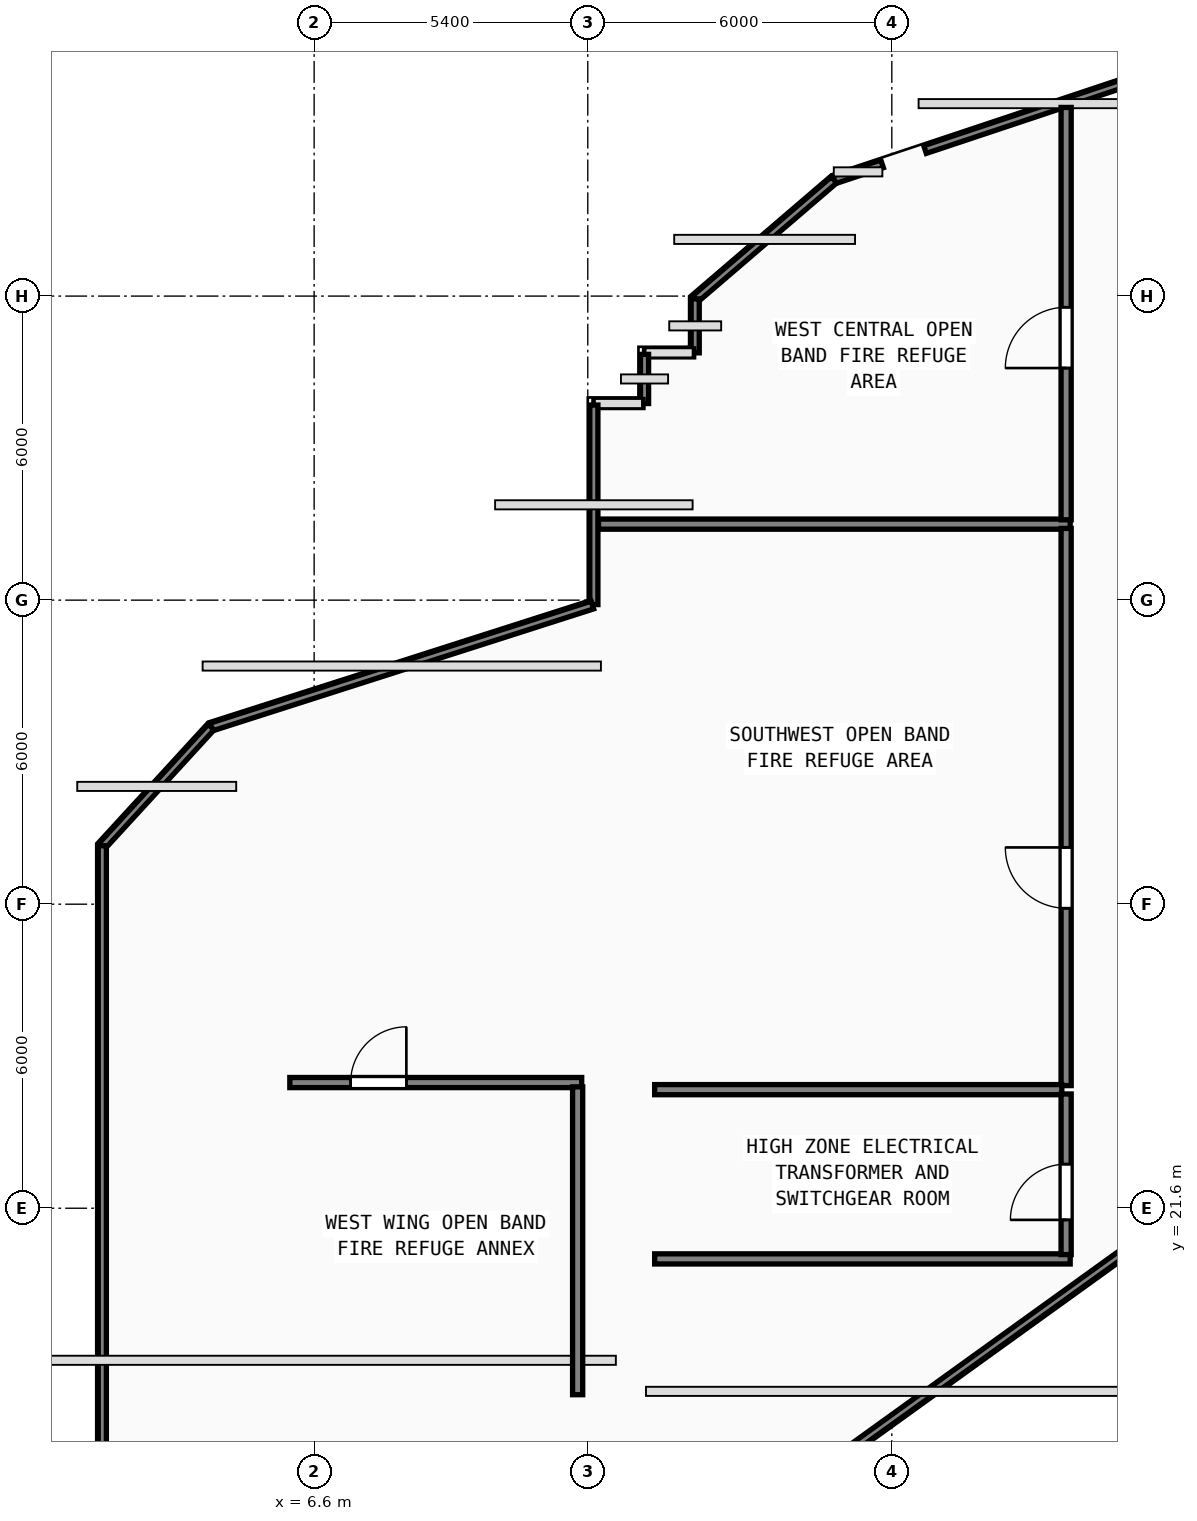
"""IFC4 building model, lengths in metres.
Left out: names, types, materials, properties, quantities, classifications, styles, units other than length and angle.
Written with IfcOpenShell. Run it as: python <this file> out.ifc"""

import sys

from ifc_helpers import new_model, si_unit, direction, frame, frame_2d, origin, origin_2d, place, context, subcontext, project, spatial, rectangle, hollow_rectangle, extrude, element, fill, save


model = new_model("IFC4")
c1 = context("Model", 3, precision=1e-05, world=origin(), true_north=direction((0.0, 1.0)))
c2 = subcontext(c1, "Body", "Model", "MODEL_VIEW")
j1 = project(units=[si_unit("LENGTHUNIT", "METRE"), si_unit("PLANEANGLEUNIT", "RADIAN")], contexts=[c1])
p1 = place(None, origin())
s1 = spatial("IfcSite", under=j1, at=p1, CompositionType="ELEMENT")
p2 = place(p1, origin())
s2 = spatial("IfcBuilding", under=s1, at=p2, CompositionType="ELEMENT")
p3 = place(p2, frame((0.0, 0.0, 43.0)))
s3 = spatial("IfcBuildingStorey", under=s2, at=p3, CompositionType="ELEMENT", Elevation=43.0)
for number, where, z_axis, x_axis in (
    (1, (12.6, 16.8, 0.0), (0.0, 0.0, 1.0), (1.0, 0.0, 0.0)),
    (2, (12.6, 27.6, 0.0), (0.0, 0.0, 1.0), (1.0, 0.0, 0.0)),
):
    element("IfcColumn", number, at=place(p3, frame(where, z_axis=z_axis, x_axis=x_axis)), inside=s3, PredefinedType="COLUMN", context=c2, shape_type="SweptSolid", body=[
        extrude(hollow_rectangle(XDim=1.3, YDim=1.3, WallThickness=0.048, at=origin_2d()), origin(), (0.0, 0.0, 1.0), 4.6),
    ])
for number, where, z_axis, x_axis in (
    (3, (6.0, 17.4, 0.0), (0.0, 0.0, 1.0), (1.0, 0.0, 0.0)),
    (4, (6.0, 27.6, 0.0), (0.0, 0.0, 1.0), (1.0, 0.0, 0.0)),
):
    element("IfcColumn", number, at=place(p3, frame(where, z_axis=z_axis, x_axis=x_axis)), inside=s3, PredefinedType="COLUMN", context=c2, shape_type="SweptSolid", body=[
        extrude(hollow_rectangle(XDim=1.15, YDim=1.15, WallThickness=0.042, at=origin_2d()), origin(), (0.0, 0.0, 1.0), 4.6),
    ])
for number, where, z_axis, x_axis in (
    (5, (18.3, 19.2, 0.0), (0.0, 0.0, 1.0), (1.0, 0.0, 0.0)),
    (6, (18.3, 42.0, 0.0), (0.0, 0.0, 1.0), (1.0, 0.0, 0.0)),
    (7, (9.3, 17.1, 0.0), (0.0, 0.0, 1.0), (1.0, 0.0, 0.0)),
    (8, (9.3, 27.6, 0.0), (0.0, 0.0, 1.0), (1.0, 0.0, 0.0)),
):
    element("IfcColumn", number, at=place(p3, frame(where, z_axis=z_axis, x_axis=x_axis)), inside=s3, PredefinedType="COLUMN", context=c2, shape_type="SweptSolid", body=[
        extrude(hollow_rectangle(XDim=1.0, YDim=1.0, WallThickness=0.038, at=origin_2d()), origin(), (0.0, 0.0, 1.0), 4.6),
    ])
p4 = place(p3, frame((14.193, 14.687, 0.0), z_axis=(0.0, 0.0, 1.0), x_axis=(0.81153516154, 0.584303586832, 0.0)))
e9 = element("IfcWall", 9, at=p4, inside=s3, PredefinedType="PARAPET", context=c2, shape_type="SweptSolid", body=[
    extrude(rectangle(XDim=11.293, YDim=0.16, at=frame_2d((5.646, 0.0))), origin(), (0.0, 0.0, 1.0), 1.15),
])
p5 = place(p3, frame((24.092, 44.304, 0.0), z_axis=(0.0, 0.0, 1.0), x_axis=(-0.948683298051, -0.316227766017, 0.0)))
e10 = element("IfcWall", 10, at=p5, inside=s3, PredefinedType="PARAPET", context=c2, shape_type="SweptSolid", body=[
    extrude(rectangle(XDim=5.73, YDim=0.16, at=frame_2d((2.865, 0.0))), origin(), (0.0, 0.0, 1.0), 1.15),
])
p6 = place(p3, frame((17.808, 42.209, 0.0), z_axis=(0.0, 0.0, 1.0), x_axis=(-0.948707727558, -0.316154468056, 0.0)))
e11 = element("IfcWall", 11, at=p6, inside=s3, PredefinedType="PARAPET", context=c2, shape_type="SweptSolid", body=[
    extrude(rectangle(XDim=0.999, YDim=0.16, at=frame_2d((0.5, 0.0))), origin(), (0.0, 0.0, 1.0), 1.15),
])
p7 = place(p3, frame((16.86, 41.894, 0.0), z_axis=(0.0, 0.0, 1.0), x_axis=(-0.759247051556, -0.650802515902, 0.0)))
e12 = element("IfcWall", 12, at=p7, inside=s3, PredefinedType="PARAPET", context=c2, shape_type="SweptSolid", body=[
    extrude(rectangle(XDim=3.609, YDim=0.16, at=frame_2d((1.804, 0.0))), origin(), (0.0, 0.0, 1.0), 1.15),
])
p8 = place(p3, frame((14.12, 39.545, 0.0), z_axis=(0.0, 0.0, 1.0), x_axis=(0.0, -1.0, 0.0)))
e13 = element("IfcWall", 13, at=p8, inside=s3, PredefinedType="PARAPET", context=c2, shape_type="SweptSolid", body=[
    extrude(rectangle(XDim=1.065, YDim=0.16, at=frame_2d((0.532, 0.0))), origin(), (0.0, 0.0, 1.0), 1.15),
])
for number, where, z_axis, x_axis in (
    (14, (14.09, 38.48, 0.0), (0.0, 0.0, 1.0), (-1.0, 0.0, 0.0)),
    (15, (13.12, 38.45, 0.0), (0.0, 0.0, 1.0), (0.0, -1.0, 0.0)),
    (16, (13.09, 37.48, 0.0), (0.0, 0.0, 1.0), (-1.0, 0.0, 0.0)),
):
    element("IfcWall", number, at=place(p3, frame(where, z_axis=z_axis, x_axis=x_axis)), inside=s3, PredefinedType="PARAPET", context=c2, shape_type="SweptSolid", body=[
        extrude(rectangle(XDim=0.97, YDim=0.16, at=frame_2d((0.485, 0.0))), origin(), (0.0, 0.0, 1.0), 1.15),
    ])
p9 = place(p3, frame((12.12, 37.45, 0.0), z_axis=(0.0, 0.0, 1.0), x_axis=(0.0, -1.0, 0.0)))
e17 = element("IfcWall", 17, at=p9, inside=s3, PredefinedType="PARAPET", context=c2, shape_type="SweptSolid", body=[
    extrude(rectangle(XDim=3.938, YDim=0.16, at=frame_2d((1.969, 0.0))), origin(), (0.0, 0.0, 1.0), 1.15),
])
p10 = place(p3, frame((12.091, 33.503, 0.0), z_axis=(0.0, 0.0, 1.0), x_axis=(-0.952418764882, -0.304792546334, 0.0)))
e18 = element("IfcWall", 18, at=p10, inside=s3, PredefinedType="PARAPET", context=c2, shape_type="SweptSolid", body=[
    extrude(rectangle(XDim=7.9, YDim=0.16, at=frame_2d((3.95, 0.0))), origin(), (0.0, 0.0, 1.0), 1.15),
])
p11 = place(p3, frame((4.567, 31.095, 0.0), z_axis=(0.0, 0.0, 1.0), x_axis=(-0.67574202635, -0.73713819181, 0.0)))
e19 = element("IfcWall", 19, at=p11, inside=s3, PredefinedType="PARAPET", context=c2, shape_type="SweptSolid", body=[
    extrude(rectangle(XDim=3.177, YDim=0.16, at=frame_2d((1.589, 0.0))), origin(), (0.0, 0.0, 1.0), 1.15),
])
p12 = place(p3, frame((2.42, 28.753, 0.0), z_axis=(0.0, 0.0, 1.0), x_axis=(0.0, -1.0, 0.0)))
e20 = element("IfcWall", 20, at=p12, inside=s3, PredefinedType="PARAPET", context=c2, shape_type="SweptSolid", body=[
    extrude(rectangle(XDim=20.308, YDim=0.16, at=frame_2d((10.154, 0.0))), origin(), (0.0, 0.0, 1.0), 1.15),
])
p13 = place(p3, frame((12.212, 35.1, 0.0), z_axis=(0.0, 0.0, 1.0), x_axis=(1.0, 0.0, 0.0)))
e21 = element("IfcWall", 21, at=p13, inside=s3, PredefinedType="SOLIDWALL", context=c2, shape_type="SweptSolid", body=[
    extrude(rectangle(XDim=9.308, YDim=0.2, at=frame_2d((4.654, 0.0))), origin(), (0.0, 0.0, 1.0), 4.4),
])
p14 = place(p3, frame((21.44, 24.02, 0.0), z_axis=(0.0, 0.0, 1.0), x_axis=(0.0, 1.0, 0.0)))
e22 = element("IfcWall", 22, at=p14, inside=s3, PredefinedType="SOLIDWALL", context=c2, shape_type="SweptSolid", body=[
    extrude(rectangle(XDim=10.995, YDim=0.2, at=frame_2d((5.498, 0.0))), origin(), (0.0, 0.0, 1.0), 4.4),
])
p15 = place(p14, frame((4.7, 0.0, 0.0), z_axis=(0.0, 0.0, 1.0), x_axis=(-1.0, 0.0, 0.0)))
e23 = element("IfcOpeningElement", 23, at=p15, cuts=e22, PredefinedType="OPENING", context=c2, shape_type="SweptSolid", body=[
    extrude(rectangle(XDim=1.2, YDim=2.15, at=frame_2d((0.6, 1.075))), frame((0.0, 0.11, 0.0), z_axis=(0.0, -1.0, 0.0), x_axis=(1.0, 0.0, 0.0)), (0.0, 0.0, 1.0), 0.22),
])
p16 = place(p3, frame((21.44, 35.185, 0.0), z_axis=(0.0, 0.0, 1.0), x_axis=(0.0, 1.0, 0.0)))
e24 = element("IfcWall", 24, at=p16, inside=s3, PredefinedType="SOLIDWALL", context=c2, shape_type="SweptSolid", body=[
    extrude(rectangle(XDim=8.138, YDim=0.2, at=frame_2d((4.069, 0.0))), origin(), (0.0, 0.0, 1.0), 4.4),
])
p17 = place(p16, frame((4.195, 0.0, 0.0), z_axis=(0.0, 0.0, 1.0), x_axis=(-1.0, 0.0, 0.0)))
e25 = element("IfcOpeningElement", 25, at=p17, cuts=e24, PredefinedType="OPENING", context=c2, shape_type="SweptSolid", body=[
    extrude(rectangle(XDim=1.2, YDim=2.15, at=frame_2d((0.6, 1.075))), frame((0.0, 0.11, 0.0), z_axis=(0.0, -1.0, 0.0), x_axis=(1.0, 0.0, 0.0)), (0.0, 0.0, 1.0), 0.22),
])
p18 = place(p3, frame((13.32, 23.94, 0.0), z_axis=(0.0, 0.0, 1.0), x_axis=(1.0, 0.0, 0.0)))
e26 = element("IfcWall", 26, at=p18, inside=s3, PredefinedType="SOLIDWALL", context=c2, shape_type="SweptSolid", body=[
    extrude(rectangle(XDim=8.035, YDim=0.2, at=frame_2d((4.018, 0.0))), origin(), (0.0, 0.0, 1.0), 4.4),
])
p19 = place(p3, frame((13.32, 20.6, 0.0), z_axis=(0.0, 0.0, 1.0), x_axis=(1.0, 0.0, 0.0)))
e27 = element("IfcWall", 27, at=p19, inside=s3, PredefinedType="SOLIDWALL", context=c2, shape_type="SweptSolid", body=[
    extrude(rectangle(XDim=8.2, YDim=0.2, at=frame_2d((4.1, 0.0))), origin(), (0.0, 0.0, 1.0), 4.4),
])
p20 = place(p3, frame((21.44, 20.685, 0.0), z_axis=(0.0, 0.0, 1.0), x_axis=(0.0, 1.0, 0.0)))
e28 = element("IfcWall", 28, at=p20, inside=s3, PredefinedType="SOLIDWALL", context=c2, shape_type="SweptSolid", body=[
    extrude(rectangle(XDim=3.17, YDim=0.2, at=frame_2d((1.585, 0.0))), origin(), (0.0, 0.0, 1.0), 4.4),
])
p21 = place(p20, frame((1.785, 0.0, 0.0), z_axis=(0.0, 0.0, 1.0), x_axis=(-1.0, 0.0, 0.0)))
e29 = element("IfcOpeningElement", 29, at=p21, cuts=e28, PredefinedType="OPENING", context=c2, shape_type="SweptSolid", body=[
    extrude(rectangle(XDim=1.1, YDim=2.15, at=frame_2d((0.55, 1.075))), frame((0.0, 0.11, 0.0), z_axis=(0.0, -1.0, 0.0), x_axis=(1.0, 0.0, 0.0)), (0.0, 0.0, 1.0), 0.22),
])
p22 = place(p3, frame((6.12, 24.08, 0.0), z_axis=(0.0, 0.0, 1.0), x_axis=(1.0, 0.0, 0.0)))
e30 = element("IfcWall", 30, at=p22, inside=s3, PredefinedType="SOLIDWALL", context=c2, shape_type="SweptSolid", body=[
    extrude(rectangle(XDim=5.76, YDim=0.2, at=frame_2d((2.88, 0.0))), origin(), (0.0, 0.0, 1.0), 4.4),
])
p23 = place(p22, frame((2.3, 0.0, 0.0), z_axis=(0.0, 0.0, 1.0), x_axis=(-1.0, 0.0, 0.0)))
e31 = element("IfcOpeningElement", 31, at=p23, cuts=e30, PredefinedType="OPENING", context=c2, shape_type="SweptSolid", body=[
    extrude(rectangle(XDim=1.1, YDim=2.15, at=frame_2d((0.55, 1.075))), frame((0.0, 0.11, 0.0), z_axis=(0.0, -1.0, 0.0), x_axis=(1.0, 0.0, 0.0)), (0.0, 0.0, 1.0), 0.22),
])
p24 = place(p3, frame((11.8, 17.92, 0.0), z_axis=(0.0, 0.0, 1.0), x_axis=(0.0, 1.0, 0.0)))
e32 = element("IfcWall", 32, at=p24, inside=s3, PredefinedType="SOLIDWALL", context=c2, shape_type="SweptSolid", body=[
    extrude(rectangle(XDim=6.075, YDim=0.2, at=frame_2d((3.038, 0.0))), origin(), (0.0, 0.0, 1.0), 4.4),
])
p25 = place(p15, origin())
e33 = element("IfcDoor", 33, at=p25, inside=s3, OperationType="SINGLE_SWING_LEFT", PredefinedType="DOOR", context=c2, shape_type="SweptSolid", body=[
    extrude(rectangle(XDim=1.2, YDim=2.15, at=frame_2d((0.6, 1.075))), frame((0.0, 0.025, 0.0), z_axis=(0.0, -1.0, 0.0), x_axis=(1.0, 0.0, 0.0)), (0.0, 0.0, 1.0), 0.05),
])
fill(e23, e33)
p26 = place(p17, origin())
e34 = element("IfcDoor", 34, at=p26, inside=s3, OperationType="SINGLE_SWING_RIGHT", PredefinedType="DOOR", context=c2, shape_type="SweptSolid", body=[
    extrude(rectangle(XDim=1.2, YDim=2.15, at=frame_2d((0.6, 1.075))), frame((0.0, 0.025, 0.0), z_axis=(0.0, -1.0, 0.0), x_axis=(1.0, 0.0, 0.0)), (0.0, 0.0, 1.0), 0.05),
])
fill(e25, e34)
p27 = place(p21, origin())
e35 = element("IfcDoor", 35, at=p27, inside=s3, OperationType="SINGLE_SWING_RIGHT", PredefinedType="DOOR", context=c2, shape_type="SweptSolid", body=[
    extrude(rectangle(XDim=1.1, YDim=2.15, at=frame_2d((0.55, 1.075))), frame((0.0, 0.025, 0.0), z_axis=(0.0, -1.0, 0.0), x_axis=(1.0, 0.0, 0.0)), (0.0, 0.0, 1.0), 0.05),
])
fill(e29, e35)
p28 = place(p23, origin())
e36 = element("IfcDoor", 36, at=p28, inside=s3, OperationType="SINGLE_SWING_LEFT", PredefinedType="DOOR", context=c2, shape_type="SweptSolid", body=[
    extrude(rectangle(XDim=1.1, YDim=2.15, at=frame_2d((0.55, 1.075))), frame((0.0, 0.025, 0.0), z_axis=(0.0, -1.0, 0.0), x_axis=(1.0, 0.0, 0.0)), (0.0, 0.0, 1.0), 0.05),
])
fill(e31, e36)
save(model, sys.argv[1])
